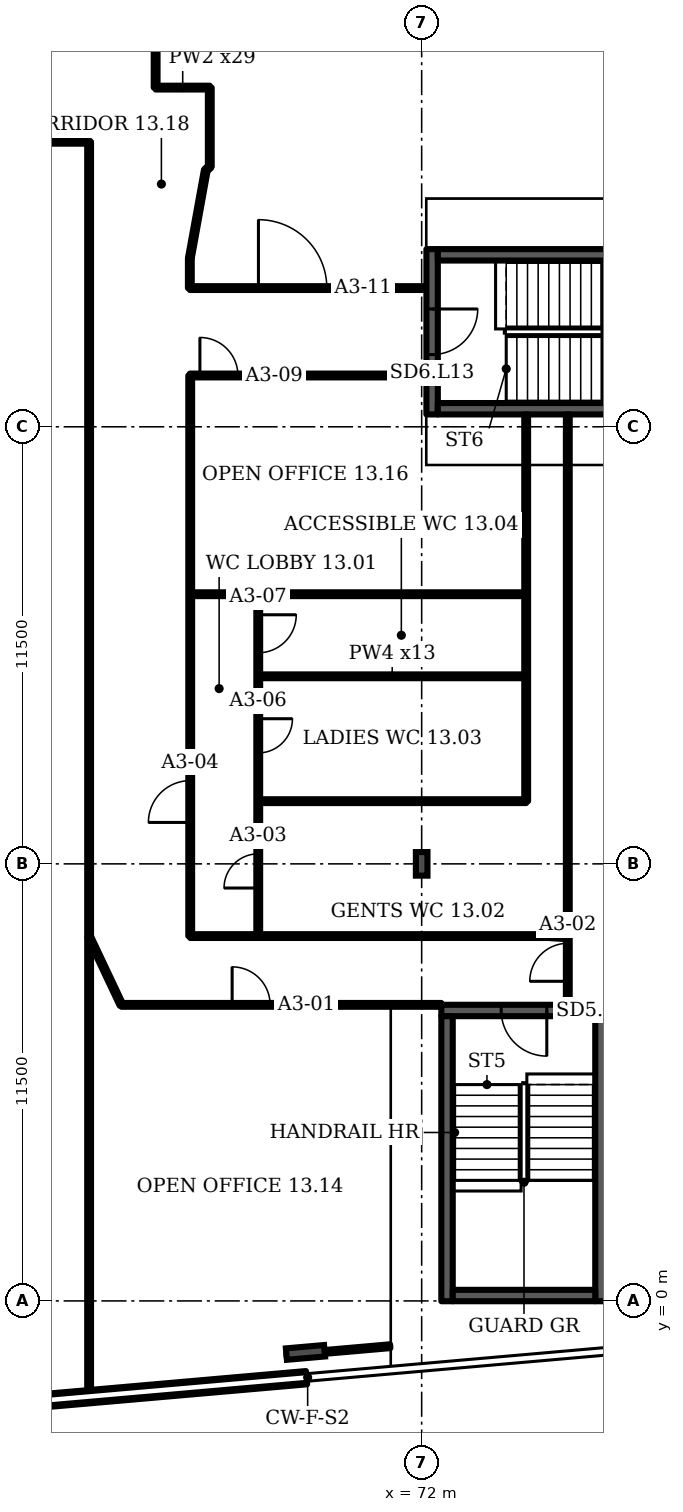
"""IFC4 building model, lengths in metres.
Left out: names, types, materials, properties, quantities, classifications, styles, units other than length and angle.
Written with IfcOpenShell. Run it as: python <this file> out.ifc"""

import sys

from ifc_helpers import new_model, si_unit, direction, frame, frame_2d, origin, origin_2d, place, context, subcontext, project, spatial, rectangle, i_section, extrude, element, fill, save


model = new_model("IFC4")
c1 = context("Model", 3, precision=1e-05, world=origin(), true_north=direction((0.0, 1.0)))
c2 = subcontext(c1, "Body", "Model", "MODEL_VIEW")
j1 = project(units=[si_unit("LENGTHUNIT", "METRE"), si_unit("PLANEANGLEUNIT", "RADIAN")], contexts=[c1])
p1 = place(None, origin())
s1 = spatial("IfcSite", under=j1, at=p1, CompositionType="ELEMENT")
p2 = place(p1, origin())
s2 = spatial("IfcBuilding", under=s1, at=p2, CompositionType="ELEMENT")
p3 = place(p2, frame((0.0, 0.0, 66.7)))
s3 = spatial("IfcBuildingStorey", under=s2, at=p3, CompositionType="ELEMENT", Elevation=66.7)
p4 = place(p3, frame((68.942, -1.355, 0.0), z_axis=(0.0, 0.0, 1.0), x_axis=(0.087156, -0.996198, 0.0)))
e1 = element("IfcColumn", 1, at=p4, inside=s3, PredefinedType="COLUMN", context=c2, shape_type="SweptSolid", body=[
    extrude(i_section(OverallWidth=0.302, OverallDepth=1.008, WebThickness=0.021, FlangeThickness=0.04, FilletRadius=0.03, at=origin_2d()), origin(), (0.0, 0.0, 1.0), 3.6),
])
p5 = place(p3, frame((72.0, 11.5, 0.0), z_axis=(0.0, 0.0, 1.0), x_axis=(1.0, 0.0, 0.0)))
e2 = element("IfcColumn", 2, at=p5, inside=s3, PredefinedType="COLUMN", context=c2, shape_type="SweptSolid", body=[
    extrude(i_section(OverallWidth=0.305, OverallDepth=0.62, WebThickness=0.021, FlangeThickness=0.04, FilletRadius=0.027, at=origin_2d()), origin(), (0.0, 0.0, 1.0), 3.6),
])
p6 = place(p3, frame((46.045, -4.026, 0.0), z_axis=(0.0, 0.0, 1.0), x_axis=(0.99619, 0.087163, 0.0)))
e3 = element("IfcWall", 3, at=p6, inside=s3, PredefinedType="SOLIDWALL", context=c2, shape_type="SweptSolid", body=[
    extrude(rectangle(XDim=23.013, YDim=0.35, at=frame_2d((11.506, 0.0))), origin(), (0.0, 0.0, 1.0), 1.0),
])
p7 = place(p3, frame((72.518, 7.642, 0.0), z_axis=(0.0, 0.0, 1.0), x_axis=(1.0, 0.0, 0.0)))
e4 = element("IfcWall", 4, at=p7, inside=s3, PredefinedType="SHEAR", context=c2, shape_type="SweptSolid", body=[
    extrude(rectangle(XDim=4.35, YDim=0.3, at=frame_2d((2.175, 0.0))), origin(), (0.0, 0.0, 1.0), 3.2),
])
p8 = place(p7, frame((1.575, 0.0, 0.0)))
e5 = element("IfcOpeningElement", 5, at=p8, cuts=e4, PredefinedType="OPENING", context=c2, shape_type="SweptSolid", body=[
    extrude(rectangle(XDim=1.2, YDim=2.1, at=frame_2d((0.6, 1.05))), frame((0.0, 0.16, 0.0), z_axis=(0.0, -1.0, 0.0), x_axis=(1.0, 0.0, 0.0)), (0.0, 0.0, 1.0), 0.32),
])
p9 = place(p3, frame((72.275, 23.325, 0.0), z_axis=(0.0, 0.0, 1.0), x_axis=(0.0, 1.0, 0.0)))
e6 = element("IfcWall", 6, at=p9, inside=s3, PredefinedType="SHEAR", context=c2, shape_type="SweptSolid", body=[
    extrude(rectangle(XDim=4.35, YDim=0.3, at=frame_2d((2.175, 0.0))), origin(), (0.0, 0.0, 1.0), 3.2),
])
p10 = place(p9, frame((1.575, 0.0, 0.0)))
e7 = element("IfcOpeningElement", 7, at=p10, cuts=e6, PredefinedType="OPENING", context=c2, shape_type="SweptSolid", body=[
    extrude(rectangle(XDim=1.2, YDim=2.1, at=frame_2d((0.6, 1.05))), frame((0.0, 0.16, 0.0), z_axis=(0.0, -1.0, 0.0), x_axis=(1.0, 0.0, 0.0)), (0.0, 0.0, 1.0), 0.32),
])
p11 = place(p3, frame((63.25, -2.495, 0.0), z_axis=(0.0, 0.0, 1.0), x_axis=(0.0, 1.0, 0.0)))
e8 = element("IfcWall", 8, at=p11, inside=s3, PredefinedType="PARTITIONING", context=c2, shape_type="SweptSolid", body=[
    extrude(rectangle(XDim=32.995, YDim=0.1, at=frame_2d((16.498, 0.0))), origin(), (0.0, 0.0, 1.0), 2.58),
])
p12 = place(p3, frame((64.1, 7.79, 0.0), z_axis=(0.0, 0.0, 1.0), x_axis=(1.0, 0.0, 0.0)))
e9 = element("IfcWall", 9, at=p12, inside=s3, PredefinedType="PARTITIONING", context=c2, shape_type="SweptSolid", body=[
    extrude(rectangle(XDim=8.417, YDim=0.1, at=frame_2d((4.209, 0.0))), origin(), (0.0, 0.0, 1.0), 3.2),
])
p13 = place(p12, frame((2.913, 0.0, 0.0)))
e10 = element("IfcOpeningElement", 10, at=p13, cuts=e9, PredefinedType="OPENING", context=c2, shape_type="SweptSolid", body=[
    extrude(rectangle(XDim=1.0, YDim=2.1, at=frame_2d((0.5, 1.05))), frame((0.0, 0.06, 0.0), z_axis=(0.0, -1.0, 0.0), x_axis=(1.0, 0.0, 0.0)), (0.0, 0.0, 1.0), 0.12),
])
p14 = place(p3, frame((64.1, 7.79, 0.0), z_axis=(0.0, 0.0, 1.0), x_axis=(-0.428035, 0.903766, 0.0)))
e11 = element("IfcWall", 11, at=p14, inside=s3, PredefinedType="PARTITIONING", context=c2, shape_type="SweptSolid", body=[
    extrude(rectangle(XDim=1.986, YDim=0.1, at=frame_2d((0.993, 0.0))), origin(), (0.0, 0.0, 1.0), 3.2),
])
p15 = place(p3, frame((65.0, 31.925, 0.0), z_axis=(0.0, 0.0, 1.0), x_axis=(0.0, 1.0, 0.0)))
e12 = element("IfcWall", 12, at=p15, inside=s3, PredefinedType="PARTITIONING", context=c2, shape_type="SweptSolid", body=[
    extrude(rectangle(XDim=2.055, YDim=0.1, at=frame_2d((1.027, 0.0))), origin(), (0.0, 0.0, 1.0), 3.2),
])
p16 = place(p3, frame((65.0, 31.925, 0.0), z_axis=(0.0, 0.0, 1.0), x_axis=(1.0, 0.0, 0.0)))
e13 = element("IfcWall", 13, at=p16, inside=s3, PredefinedType="PARTITIONING", context=c2, shape_type="SweptSolid", body=[
    extrude(rectangle(XDim=1.425, YDim=0.1, at=frame_2d((0.712, 0.0))), origin(), (0.0, 0.0, 1.0), 3.2),
])
p17 = place(p3, frame((65.9, 24.35, 0.0), z_axis=(0.0, 0.0, 1.0), x_axis=(1.0, 0.0, 0.0)))
e14 = element("IfcWall", 14, at=p17, inside=s3, PredefinedType="PARTITIONING", context=c2, shape_type="SweptSolid", body=[
    extrude(rectangle(XDim=6.205, YDim=0.1, at=frame_2d((3.103, 0.0))), origin(), (0.0, 0.0, 1.0), 3.2),
])
p18 = place(p17, frame((0.265, 0.0, 0.0)))
e15 = element("IfcOpeningElement", 15, at=p18, cuts=e14, PredefinedType="OPENING", context=c2, shape_type="SweptSolid", body=[
    extrude(rectangle(XDim=1.0, YDim=2.1, at=frame_2d((0.5, 1.05))), frame((0.0, 0.06, 0.0), z_axis=(0.0, -1.0, 0.0), x_axis=(1.0, 0.0, 0.0)), (0.0, 0.0, 1.0), 0.12),
])
p19 = place(p3, frame((65.9, 26.65, 0.0), z_axis=(0.0, 0.0, 1.0), x_axis=(0.0, 1.0, 0.0)))
e16 = element("IfcWall", 16, at=p19, inside=s3, PredefinedType="PARTITIONING", context=c2, shape_type="SweptSolid", body=[
    extrude(rectangle(XDim=0.785, YDim=0.1, at=frame_2d((0.393, 0.0))), origin(), (0.0, 0.0, 1.0), 3.2),
])
p20 = place(p3, frame((65.9, 26.65, 0.0), z_axis=(0.0, 0.0, 1.0), x_axis=(1.0, 0.0, 0.0)))
e17 = element("IfcWall", 17, at=p20, inside=s3, PredefinedType="PARTITIONING", context=c2, shape_type="SweptSolid", body=[
    extrude(rectangle(XDim=6.205, YDim=0.1, at=frame_2d((3.103, 0.0))), origin(), (0.0, 0.0, 1.0), 3.2),
])
p21 = place(p20, frame((1.805, 0.0, 0.0)))
e18 = element("IfcOpeningElement", 18, at=p21, cuts=e17, PredefinedType="OPENING", context=c2, shape_type="SweptSolid", body=[
    extrude(rectangle(XDim=1.8, YDim=2.1, at=frame_2d((0.9, 1.05))), frame((0.0, 0.06, 0.0), z_axis=(0.0, -1.0, 0.0), x_axis=(1.0, 0.0, 0.0)), (0.0, 0.0, 1.0), 0.12),
])
p22 = place(p3, frame((65.9, 27.435, 0.0), z_axis=(0.0, 0.0, 1.0), x_axis=(0.178584, 0.983924, 0.0)))
e19 = element("IfcWall", 19, at=p22, inside=s3, PredefinedType="PARTITIONING", context=c2, shape_type="SweptSolid", body=[
    extrude(rectangle(XDim=2.353, YDim=0.1, at=frame_2d((1.176, 0.0))), origin(), (0.0, 0.0, 1.0), 3.2),
])
p23 = place(p3, frame((65.91, 9.6, 0.0), z_axis=(0.0, 0.0, 1.0), x_axis=(0.0, 1.0, 0.0)))
e20 = element("IfcWall", 20, at=p23, inside=s3, PredefinedType="PARTITIONING", context=c2, shape_type="SweptSolid", body=[
    extrude(rectangle(XDim=14.75, YDim=0.1, at=frame_2d((7.375, 0.0))), origin(), (0.0, 0.0, 1.0), 3.2),
])
p24 = place(p23, frame((2.99, 0.0, 0.0)))
e21 = element("IfcOpeningElement", 21, at=p24, cuts=e20, PredefinedType="OPENING", context=c2, shape_type="SweptSolid", body=[
    extrude(rectangle(XDim=1.1, YDim=2.1, at=frame_2d((0.55, 1.05))), frame((0.0, 0.06, 0.0), z_axis=(0.0, -1.0, 0.0), x_axis=(1.0, 0.0, 0.0)), (0.0, 0.0, 1.0), 0.12),
])
p25 = place(p3, frame((65.91, 9.6, 0.0), z_axis=(0.0, 0.0, 1.0), x_axis=(1.0, 0.0, 0.0)))
e22 = element("IfcWall", 22, at=p25, inside=s3, PredefinedType="PARTITIONING", context=c2, shape_type="SweptSolid", body=[
    extrude(rectangle(XDim=9.485, YDim=0.1, at=frame_2d((4.743, 0.0))), origin(), (0.0, 0.0, 1.0), 3.2),
])
p26 = place(p3, frame((65.91, 18.595, 0.0), z_axis=(0.0, 0.0, 1.0), x_axis=(1.0, 0.0, 0.0)))
e23 = element("IfcWall", 23, at=p26, inside=s3, PredefinedType="PARTITIONING", context=c2, shape_type="SweptSolid", body=[
    extrude(rectangle(XDim=8.84, YDim=0.1, at=frame_2d((4.42, 0.0))), origin(), (0.0, 0.0, 1.0), 3.2),
])
p27 = place(p3, frame((66.32, 29.75, 0.0), z_axis=(0.0, 0.0, 1.0), x_axis=(0.741581, 0.670872, 0.0)))
e24 = element("IfcWall", 24, at=p27, inside=s3, PredefinedType="PARTITIONING", context=c2, shape_type="SweptSolid", body=[
    extrude(rectangle(XDim=0.142, YDim=0.1, at=frame_2d((0.071, 0.0))), origin(), (0.0, 0.0, 1.0), 3.2),
])
p28 = place(p3, frame((66.425, 29.845, 0.0), z_axis=(0.0, 0.0, 1.0), x_axis=(0.0, 1.0, 0.0)))
e25 = element("IfcWall", 25, at=p28, inside=s3, PredefinedType="PARTITIONING", context=c2, shape_type="SweptSolid", body=[
    extrude(rectangle(XDim=2.08, YDim=0.1, at=frame_2d((1.04, 0.0))), origin(), (0.0, 0.0, 1.0), 3.2),
])
p29 = place(p3, frame((67.7, 9.6, 0.0), z_axis=(0.0, 0.0, 1.0), x_axis=(0.0, 1.0, 0.0)))
e26 = element("IfcWall", 26, at=p29, inside=s3, PredefinedType="PARTITIONING", context=c2, shape_type="SweptSolid", body=[
    extrude(rectangle(XDim=8.995, YDim=0.1, at=frame_2d((4.498, 0.0))), origin(), (0.0, 0.0, 1.0), 3.2),
])
p30 = place(p29, frame((1.264, 0.0, 0.0)))
e27 = element("IfcOpeningElement", 27, at=p30, cuts=e26, PredefinedType="OPENING", context=c2, shape_type="SweptSolid", body=[
    extrude(rectangle(XDim=0.9, YDim=2.1, at=frame_2d((0.45, 1.05))), frame((0.0, 0.06, 0.0), z_axis=(0.0, -1.0, 0.0), x_axis=(1.0, 0.0, 0.0)), (0.0, 0.0, 1.0), 0.12),
])
p31 = place(p29, frame((4.819, 0.0, 0.0)))
e28 = element("IfcOpeningElement", 28, at=p31, cuts=e26, PredefinedType="OPENING", context=c2, shape_type="SweptSolid", body=[
    extrude(rectangle(XDim=0.9, YDim=2.1, at=frame_2d((0.45, 1.05))), frame((0.0, 0.06, 0.0), z_axis=(0.0, -1.0, 0.0), x_axis=(1.0, 0.0, 0.0)), (0.0, 0.0, 1.0), 0.12),
])
p32 = place(p29, frame((7.454, 0.0, 0.0)))
e29 = element("IfcOpeningElement", 29, at=p32, cuts=e26, PredefinedType="OPENING", context=c2, shape_type="SweptSolid", body=[
    extrude(rectangle(XDim=1.0, YDim=2.1, at=frame_2d((0.5, 1.05))), frame((0.0, 0.06, 0.0), z_axis=(0.0, -1.0, 0.0), x_axis=(1.0, 0.0, 0.0)), (0.0, 0.0, 1.0), 0.12),
])
for number, where, z_axis, x_axis in (
    (30, (67.7, 13.15, 0.0), (0.0, 0.0, 1.0), (1.0, 0.0, 0.0)),
    (31, (67.7, 16.435, 0.0), (0.0, 0.0, 1.0), (1.0, 0.0, 0.0)),
):
    element("IfcWall", number, at=place(p3, frame(where, z_axis=z_axis, x_axis=x_axis)), inside=s3, PredefinedType="PARTITIONING", context=c2, shape_type="SweptSolid", body=[
        extrude(rectangle(XDim=7.05, YDim=0.1, at=frame_2d((3.525, 0.0))), origin(), (0.0, 0.0, 1.0), 3.2),
    ])
p33 = place(p3, frame((68.445, -1.43, 0.0), z_axis=(0.0, 0.0, 1.0), x_axis=(0.996195, 0.087118, 0.0)))
e32 = element("IfcWall", 32, at=p33, inside=s3, PredefinedType="PARTITIONING", context=c2, shape_type="SweptSolid", body=[
    extrude(rectangle(XDim=2.738, YDim=0.1, at=frame_2d((1.369, 0.0))), origin(), (0.0, 0.0, 1.0), 2.58),
])
p34 = place(p3, frame((74.75, 13.15, 0.0), z_axis=(0.0, 0.0, 1.0), x_axis=(0.0, 1.0, 0.0)))
e33 = element("IfcWall", 33, at=p34, inside=s3, PredefinedType="PARTITIONING", context=c2, shape_type="SweptSolid", body=[
    extrude(rectangle(XDim=10.175, YDim=0.1, at=frame_2d((5.087, 0.0))), origin(), (0.0, 0.0, 1.0), 3.2),
])
p35 = place(p3, frame((75.43, 10.045, 0.0), z_axis=(0.0, 0.0, 1.0), x_axis=(1.0, 0.0, 0.0)))
e34 = element("IfcWall", 34, at=p35, inside=s3, PredefinedType="PARTITIONING", context=c2, shape_type="SweptSolid", body=[
    extrude(rectangle(XDim=0.16, YDim=0.1, at=frame_2d((0.08, 0.0))), origin(), (0.0, 0.0, 1.0), 3.2),
])
p36 = place(p3, frame((75.725, 9.575, 0.0), z_axis=(0.0, 0.0, 1.0), x_axis=(-0.99817, 0.06054, 0.0)))
e35 = element("IfcWall", 35, at=p36, inside=s3, PredefinedType="PARTITIONING", context=c2, shape_type="SweptSolid", body=[
    extrude(rectangle(XDim=0.331, YDim=0.1, at=frame_2d((0.165, 0.0))), origin(), (0.0, 0.0, 1.0), 3.2),
])
p37 = place(p3, frame((75.725, 9.575, 0.0), z_axis=(0.0, 0.0, 1.0), x_axis=(0.0, 1.0, 0.0)))
e36 = element("IfcWall", 36, at=p37, inside=s3, PredefinedType="PARTITIONING", context=c2, shape_type="SweptSolid", body=[
    extrude(rectangle(XDim=0.45, YDim=0.1, at=frame_2d((0.225, 0.0))), origin(), (0.0, 0.0, 1.0), 3.2),
])
p38 = place(p3, frame((75.845, 7.812, 0.0), z_axis=(0.0, 0.0, 1.0), x_axis=(0.0, 1.0, 0.0)))
e37 = element("IfcWall", 37, at=p38, inside=s3, PredefinedType="PARTITIONING", context=c2, shape_type="SweptSolid", body=[
    extrude(rectangle(XDim=15.513, YDim=0.1, at=frame_2d((7.756, 0.0))), origin(), (0.0, 0.0, 1.0), 3.2),
])
p39 = place(p38, frame((0.598, 0.0, 0.0)))
e38 = element("IfcOpeningElement", 38, at=p39, cuts=e37, PredefinedType="OPENING", context=c2, shape_type="SweptSolid", body=[
    extrude(rectangle(XDim=1.0, YDim=2.1, at=frame_2d((0.5, 1.05))), frame((0.0, 0.06, 0.0), z_axis=(0.0, -1.0, 0.0), x_axis=(1.0, 0.0, 0.0)), (0.0, 0.0, 1.0), 0.12),
])
p40 = place(p3, frame((44.15, 30.5, 0.0), z_axis=(0.0, 0.0, 1.0), x_axis=(1.0, 0.0, 0.0)))
e39 = element("IfcWall", 39, at=p40, inside=s3, PredefinedType="PARTITIONING", context=c2, shape_type="SweptSolid", body=[
    extrude(rectangle(XDim=19.1, YDim=0.1, at=frame_2d((9.55, 0.0))), origin(), (0.0, 0.0, 1.0), 3.2),
])
p41 = place(p40, frame((10.07, 0.0, 0.0)))
e40 = element("IfcOpeningElement", 40, at=p41, cuts=e39, PredefinedType="OPENING", context=c2, shape_type="SweptSolid", body=[
    extrude(rectangle(XDim=1.0, YDim=2.1, at=frame_2d((0.5, 1.05))), frame((0.0, 0.06, 0.0), z_axis=(0.0, -1.0, 0.0), x_axis=(1.0, 0.0, 0.0)), (0.0, 0.0, 1.0), 0.12),
])
for number, where, z_axis, x_axis in (
    (41, (72.667, -0.008, 0.0), (0.0, 0.0, 1.0), (0.0, 1.0, 0.0)),
    (42, (76.718, -0.008, 0.0), (0.0, 0.0, 1.0), (0.0, 1.0, 0.0)),
):
    element("IfcWall", number, at=place(p3, frame(where, z_axis=z_axis, x_axis=x_axis)), inside=s3, PredefinedType="SHEAR", context=c2, shape_type="SweptSolid", body=[
        extrude(rectangle(XDim=7.5, YDim=0.3, at=frame_2d((3.75, 0.0))), origin(), (0.0, 0.0, 1.0), 3.2),
    ])
p42 = place(p3, frame((72.817, 0.142, 0.0), z_axis=(0.0, 0.0, 1.0), x_axis=(1.0, 0.0, 0.0)))
e43 = element("IfcWall", 43, at=p42, inside=s3, PredefinedType="SHEAR", context=c2, shape_type="SweptSolid", body=[
    extrude(rectangle(XDim=3.75, YDim=0.3, at=frame_2d((1.875, 0.0))), origin(), (0.0, 0.0, 1.0), 3.2),
])
for number, where, z_axis, x_axis in (
    (44, (72.425, 23.475, 0.0), (0.0, 0.0, 1.0), (1.0, 0.0, 0.0)),
    (45, (72.425, 27.525, 0.0), (0.0, 0.0, 1.0), (1.0, 0.0, 0.0)),
):
    element("IfcWall", number, at=place(p3, frame(where, z_axis=z_axis, x_axis=x_axis)), inside=s3, PredefinedType="SHEAR", context=c2, shape_type="SweptSolid", body=[
        extrude(rectangle(XDim=7.5, YDim=0.3, at=frame_2d((3.75, 0.0))), origin(), (0.0, 0.0, 1.0), 3.2),
    ])
p43 = place(p8, origin())
e46 = element("IfcDoor", 46, at=p43, inside=s3, OperationType="SINGLE_SWING_RIGHT", PredefinedType="DOOR", context=c2, shape_type="SweptSolid", body=[
    extrude(rectangle(XDim=1.2, YDim=2.1, at=frame_2d((0.6, 1.05))), frame((0.0, 0.025, 0.0), z_axis=(0.0, -1.0, 0.0), x_axis=(1.0, 0.0, 0.0)), (0.0, 0.0, 1.0), 0.05),
])
fill(e5, e46)
p44 = place(p10, origin())
e47 = element("IfcDoor", 47, at=p44, inside=s3, OperationType="SINGLE_SWING_RIGHT", PredefinedType="DOOR", context=c2, shape_type="SweptSolid", body=[
    extrude(rectangle(XDim=1.2, YDim=2.1, at=frame_2d((0.6, 1.05))), frame((0.0, 0.025, 0.0), z_axis=(0.0, -1.0, 0.0), x_axis=(1.0, 0.0, 0.0)), (0.0, 0.0, 1.0), 0.05),
])
fill(e7, e47)
p45 = place(p13, origin())
e48 = element("IfcDoor", 48, at=p45, inside=s3, OperationType="SINGLE_SWING_LEFT", PredefinedType="DOOR", context=c2, shape_type="SweptSolid", body=[
    extrude(rectangle(XDim=1.0, YDim=2.1, at=frame_2d((0.5, 1.05))), frame((0.0, 0.025, 0.0), z_axis=(0.0, -1.0, 0.0), x_axis=(1.0, 0.0, 0.0)), (0.0, 0.0, 1.0), 0.05),
])
fill(e10, e48)
p46 = place(p39, origin())
e49 = element("IfcDoor", 49, at=p46, inside=s3, OperationType="SINGLE_SWING_LEFT", PredefinedType="DOOR", context=c2, shape_type="SweptSolid", body=[
    extrude(rectangle(XDim=1.0, YDim=2.1, at=frame_2d((0.5, 1.05))), frame((0.0, 0.025, 0.0), z_axis=(0.0, -1.0, 0.0), x_axis=(1.0, 0.0, 0.0)), (0.0, 0.0, 1.0), 0.05),
])
fill(e38, e49)
p47 = place(p30, origin())
e50 = element("IfcDoor", 50, at=p47, inside=s3, OperationType="SINGLE_SWING_LEFT", PredefinedType="DOOR", context=c2, shape_type="SweptSolid", body=[
    extrude(rectangle(XDim=0.9, YDim=2.1, at=frame_2d((0.45, 1.05))), frame((0.0, 0.025, 0.0), z_axis=(0.0, -1.0, 0.0), x_axis=(1.0, 0.0, 0.0)), (0.0, 0.0, 1.0), 0.05),
])
fill(e27, e50)
p48 = place(p24, origin())
e51 = element("IfcDoor", 51, at=p48, inside=s3, OperationType="SINGLE_SWING_LEFT", PredefinedType="DOOR", context=c2, shape_type="SweptSolid", body=[
    extrude(rectangle(XDim=1.1, YDim=2.1, at=frame_2d((0.55, 1.05))), frame((0.0, 0.025, 0.0), z_axis=(0.0, -1.0, 0.0), x_axis=(1.0, 0.0, 0.0)), (0.0, 0.0, 1.0), 0.05),
])
fill(e21, e51)
p49 = place(p31, origin())
e52 = element("IfcDoor", 52, at=p49, inside=s3, OperationType="SINGLE_SWING_RIGHT", PredefinedType="DOOR", context=c2, shape_type="SweptSolid", body=[
    extrude(rectangle(XDim=0.9, YDim=2.1, at=frame_2d((0.45, 1.05))), frame((0.0, 0.025, 0.0), z_axis=(0.0, -1.0, 0.0), x_axis=(1.0, 0.0, 0.0)), (0.0, 0.0, 1.0), 0.05),
])
fill(e28, e52)
p50 = place(p32, origin())
e53 = element("IfcDoor", 53, at=p50, inside=s3, OperationType="SINGLE_SWING_RIGHT", PredefinedType="DOOR", context=c2, shape_type="SweptSolid", body=[
    extrude(rectangle(XDim=1.0, YDim=2.1, at=frame_2d((0.5, 1.05))), frame((0.0, 0.025, 0.0), z_axis=(0.0, -1.0, 0.0), x_axis=(1.0, 0.0, 0.0)), (0.0, 0.0, 1.0), 0.05),
])
fill(e29, e53)
p51 = place(p18, origin())
e54 = element("IfcDoor", 54, at=p51, inside=s3, OperationType="SINGLE_SWING_LEFT", PredefinedType="DOOR", context=c2, shape_type="SweptSolid", body=[
    extrude(rectangle(XDim=1.0, YDim=2.1, at=frame_2d((0.5, 1.05))), frame((0.0, 0.025, 0.0), z_axis=(0.0, -1.0, 0.0), x_axis=(1.0, 0.0, 0.0)), (0.0, 0.0, 1.0), 0.05),
])
fill(e15, e54)
p52 = place(p21, origin())
e55 = element("IfcDoor", 55, at=p52, inside=s3, OperationType="DOUBLE_DOOR_SINGLE_SWING", PredefinedType="DOOR", context=c2, shape_type="SweptSolid", body=[
    extrude(rectangle(XDim=1.8, YDim=2.1, at=frame_2d((0.9, 1.05))), frame((0.0, 0.025, 0.0), z_axis=(0.0, -1.0, 0.0), x_axis=(1.0, 0.0, 0.0)), (0.0, 0.0, 1.0), 0.05),
])
fill(e18, e55)
save(model, sys.argv[1])
